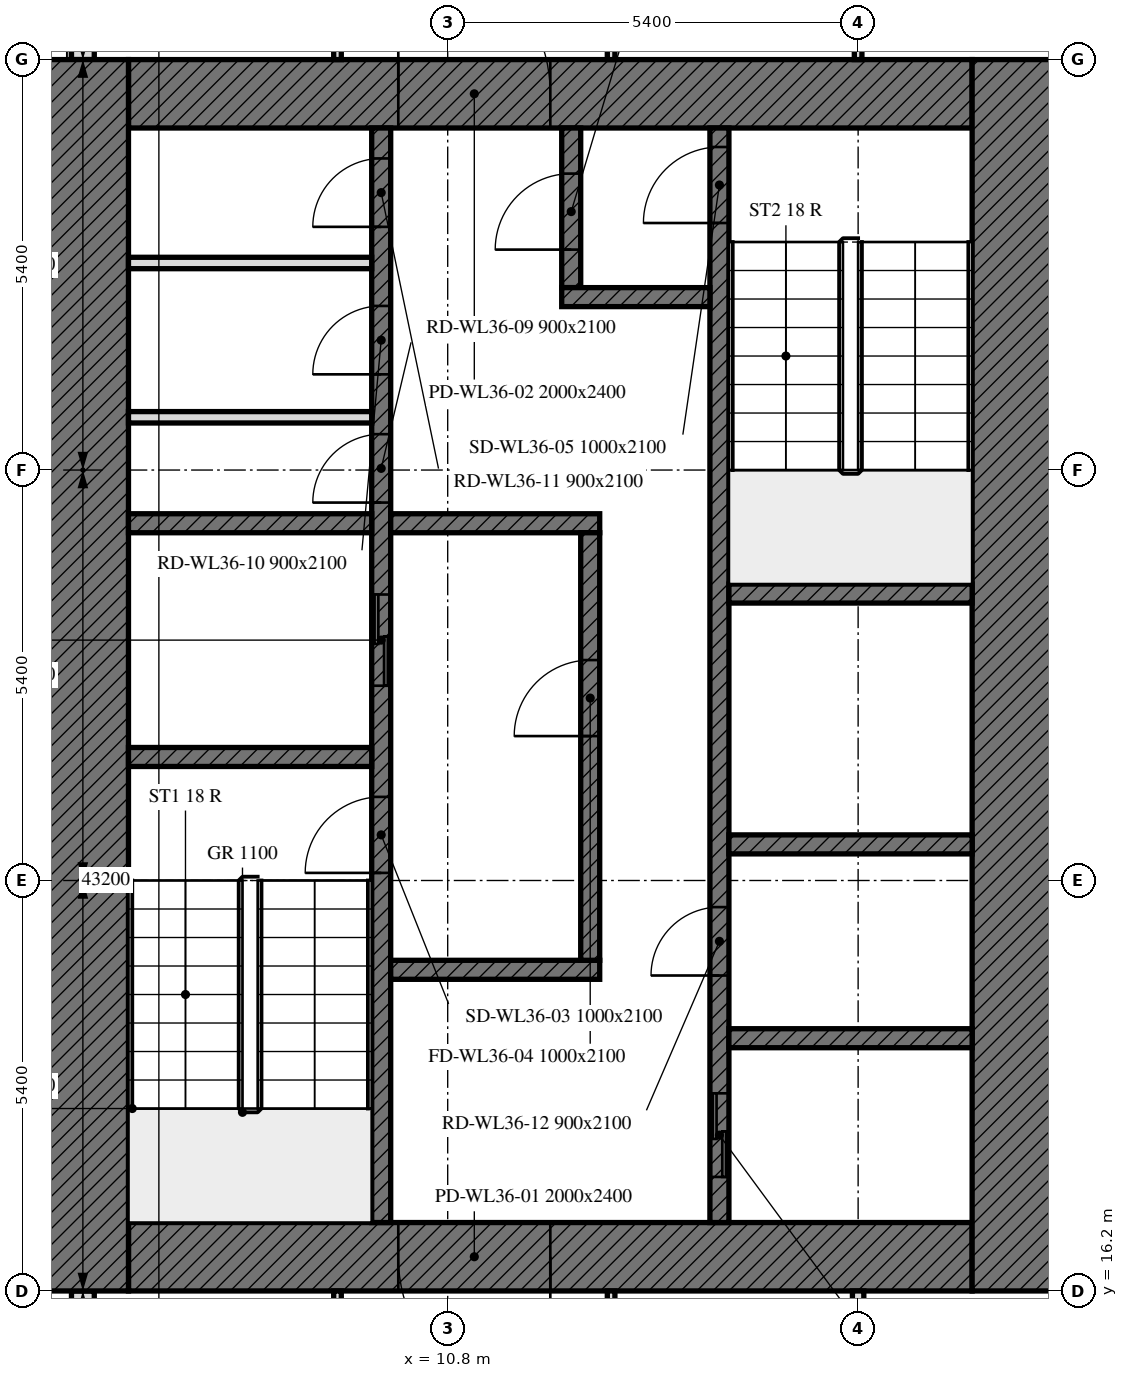
"""IFC4 building model, lengths in metres.
Left out: names, types, materials, properties, quantities, classifications, styles, units other than length and angle.
Written with IfcOpenShell. Run it as: python <this file> out.ifc"""

import sys

from ifc_helpers import new_model, si_unit, direction, frame, frame_2d, origin, place, context, subcontext, project, spatial, rectangle, extrude, element, fill, save


model = new_model("IFC4")
c1 = context("Model", 3, precision=1e-05, world=origin(), true_north=direction((0.0, 1.0)))
c2 = subcontext(c1, "Body", "Model", "MODEL_VIEW")
j1 = project(units=[si_unit("LENGTHUNIT", "METRE"), si_unit("PLANEANGLEUNIT", "RADIAN")], contexts=[c1])
p1 = place(None, origin())
s1 = spatial("IfcSite", under=j1, at=p1, CompositionType="ELEMENT")
p2 = place(p1, origin())
s2 = spatial("IfcBuilding", under=s1, at=p2, CompositionType="ELEMENT")
p3 = place(p2, frame((0.0, 0.0, 156.1)))
s3 = spatial("IfcBuildingStorey", under=s2, at=p3, CompositionType="ELEMENT", Elevation=156.1)
p4 = place(p3, frame((6.0, 37.614, 0.0), z_axis=(0.0, 0.0, 1.0), x_axis=(0.0, -1.0, 0.0)))
e1 = element("IfcWall", 1, at=p4, inside=s3, PredefinedType="SOLIDWALL", context=c2, shape_type="SweptSolid", body=[
    extrude(rectangle(XDim=5.214, YDim=0.3, at=frame_2d((2.607, 0.0))), origin(), (0.0, 0.0, 1.0), 3.0),
])
p5 = place(p4, frame((1.164, 0.0, 0.9)))
e2 = element("IfcOpeningElement", 2, at=p5, cuts=e1, PredefinedType="OPENING", context=c2, shape_type="SweptSolid", body=[
    extrude(rectangle(XDim=1.1, YDim=1.7, at=frame_2d((0.55, 0.85))), frame((0.0, 0.16, 0.0), z_axis=(0.0, -1.0, 0.0), x_axis=(1.0, 0.0, 0.0)), (0.0, 0.0, 1.0), 0.32),
])
p6 = place(p4, frame((2.764, 0.0, 0.9)))
e3 = element("IfcOpeningElement", 3, at=p6, cuts=e1, PredefinedType="OPENING", context=c2, shape_type="SweptSolid", body=[
    extrude(rectangle(XDim=1.1, YDim=1.7, at=frame_2d((0.55, 0.85))), frame((0.0, 0.16, 0.0), z_axis=(0.0, -1.0, 0.0), x_axis=(1.0, 0.0, 0.0)), (0.0, 0.0, 1.0), 0.32),
])
p7 = place(p3, frame((6.0, 16.2, 0.0), z_axis=(0.0, 0.0, 1.0), x_axis=(0.0, -1.0, 0.0)))
e4 = element("IfcWall", 4, at=p7, inside=s3, PredefinedType="SOLIDWALL", context=c2, shape_type="SweptSolid", body=[
    extrude(rectangle(XDim=10.614, YDim=0.3, at=frame_2d((5.307, 0.0))), origin(), (0.0, 0.0, 1.0), 3.0),
])
p8 = place(p7, frame((1.35, 0.0, 0.9)))
e5 = element("IfcOpeningElement", 5, at=p8, cuts=e4, PredefinedType="OPENING", context=c2, shape_type="SweptSolid", body=[
    extrude(rectangle(XDim=1.1, YDim=1.7, at=frame_2d((0.55, 0.85))), frame((0.0, 0.16, 0.0), z_axis=(0.0, -1.0, 0.0), x_axis=(1.0, 0.0, 0.0)), (0.0, 0.0, 1.0), 0.32),
])
p9 = place(p7, frame((2.95, 0.0, 0.9)))
e6 = element("IfcOpeningElement", 6, at=p9, cuts=e4, PredefinedType="OPENING", context=c2, shape_type="SweptSolid", body=[
    extrude(rectangle(XDim=1.1, YDim=1.7, at=frame_2d((0.55, 0.85))), frame((0.0, 0.16, 0.0), z_axis=(0.0, -1.0, 0.0), x_axis=(1.0, 0.0, 0.0)), (0.0, 0.0, 1.0), 0.32),
])
p10 = place(p7, frame((7.375, 0.0, 0.9)))
e7 = element("IfcOpeningElement", 7, at=p10, cuts=e4, PredefinedType="OPENING", context=c2, shape_type="SweptSolid", body=[
    extrude(rectangle(XDim=0.65, YDim=1.7, at=frame_2d((0.325, 0.85))), frame((0.0, 0.16, 0.0), z_axis=(0.0, -1.0, 0.0), x_axis=(1.0, 0.0, 0.0)), (0.0, 0.0, 1.0), 0.32),
])
p11 = place(p7, frame((8.175, 0.0, 0.9)))
e8 = element("IfcOpeningElement", 8, at=p11, cuts=e4, PredefinedType="OPENING", context=c2, shape_type="SweptSolid", body=[
    extrude(rectangle(XDim=0.65, YDim=1.7, at=frame_2d((0.325, 0.85))), frame((0.0, 0.16, 0.0), z_axis=(0.0, -1.0, 0.0), x_axis=(1.0, 0.0, 0.0)), (0.0, 0.0, 1.0), 0.32),
])
p12 = place(p3, frame((17.7, 16.65, 0.0), z_axis=(0.0, 0.0, 1.0), x_axis=(-1.0, 0.0, 0.0)))
e9 = element("IfcWall", 9, at=p12, inside=s3, PredefinedType="SOLIDWALL", context=c2, shape_type="SweptSolid", body=[
    extrude(rectangle(XDim=11.1, YDim=0.9, at=frame_2d((5.55, 0.0))), origin(), (0.0, 0.0, 1.0), 3.0),
])
p13 = place(p12, frame((5.55, 0.0, 0.0)))
e10 = element("IfcOpeningElement", 10, at=p13, cuts=e9, PredefinedType="OPENING", context=c2, shape_type="SweptSolid", body=[
    extrude(rectangle(XDim=2.0, YDim=2.4, at=frame_2d((1.0, 1.2))), frame((0.0, 0.45, 0.0), z_axis=(0.0, -1.0, 0.0), x_axis=(1.0, 0.0, 0.0)), (0.0, 0.0, 1.0), 0.9),
])
p14 = place(p3, frame((6.6, 31.95, 0.0), z_axis=(0.0, 0.0, 1.0), x_axis=(1.0, 0.0, 0.0)))
e11 = element("IfcWall", 11, at=p14, inside=s3, PredefinedType="SOLIDWALL", context=c2, shape_type="SweptSolid", body=[
    extrude(rectangle(XDim=11.1, YDim=0.9, at=frame_2d((5.55, 0.0))), origin(), (0.0, 0.0, 1.0), 3.0),
])
p15 = place(p14, frame((3.55, 0.0, 0.0)))
e12 = element("IfcOpeningElement", 12, at=p15, cuts=e11, PredefinedType="OPENING", context=c2, shape_type="SweptSolid", body=[
    extrude(rectangle(XDim=2.0, YDim=2.4, at=frame_2d((1.0, 1.2))), frame((0.0, 0.45, 0.0), z_axis=(0.0, -1.0, 0.0), x_axis=(1.0, 0.0, 0.0)), (0.0, 0.0, 1.0), 0.9),
])
for number, where, z_axis, x_axis in (
    (13, (6.0, 16.2, 0.0), (0.0, 0.0, 1.0), (0.0, 1.0, 0.0)),
    (14, (18.3, 32.4, 0.0), (0.0, 0.0, 1.0), (0.0, -1.0, 0.0)),
):
    element("IfcWall", number, at=place(p3, frame(where, z_axis=z_axis, x_axis=x_axis)), inside=s3, PredefinedType="SOLIDWALL", context=c2, shape_type="SweptSolid", body=[
        extrude(rectangle(XDim=16.2, YDim=1.2, at=frame_2d((8.1, 0.0))), origin(), (0.0, 0.0, 1.0), 3.0),
    ])
p16 = place(p3, frame((9.925, 17.1, 0.0), z_axis=(0.0, 0.0, 1.0), x_axis=(0.0, 1.0, 0.0)))
e15 = element("IfcWall", 15, at=p16, inside=s3, PredefinedType="SOLIDWALL", context=c2, shape_type="SweptSolid", body=[
    extrude(rectangle(XDim=14.4, YDim=0.25, at=frame_2d((7.2, 0.0))), origin(), (0.0, 0.0, 1.0), 3.0),
])
p17 = place(p16, frame((4.6, 0.0, 0.0)))
e16 = element("IfcOpeningElement", 16, at=p17, cuts=e15, PredefinedType="OPENING", context=c2, shape_type="SweptSolid", body=[
    extrude(rectangle(XDim=1.0, YDim=2.1, at=frame_2d((0.5, 1.05))), frame((0.0, 0.125, 0.0), z_axis=(0.0, -1.0, 0.0), x_axis=(1.0, 0.0, 0.0)), (0.0, 0.0, 1.0), 0.25),
])
p18 = place(p16, frame((7.062, 0.0, 0.0)))
e17 = element("IfcOpeningElement", 17, at=p18, cuts=e15, PredefinedType="OPENING", context=c2, shape_type="SweptSolid", body=[
    extrude(rectangle(XDim=1.2, YDim=2.1, at=frame_2d((0.6, 1.05))), frame((0.0, 0.125, 0.0), z_axis=(0.0, -1.0, 0.0), x_axis=(1.0, 0.0, 0.0)), (0.0, 0.0, 1.0), 0.25),
])
p19 = place(p16, frame((9.472, 0.0, 0.0)))
e18 = element("IfcOpeningElement", 18, at=p19, cuts=e15, PredefinedType="OPENING", context=c2, shape_type="SweptSolid", body=[
    extrude(rectangle(XDim=0.9, YDim=2.1, at=frame_2d((0.45, 1.05))), frame((0.0, 0.125, 0.0), z_axis=(0.0, -1.0, 0.0), x_axis=(1.0, 0.0, 0.0)), (0.0, 0.0, 1.0), 0.25),
])
p20 = place(p16, frame((11.159, 0.0, 0.0)))
e19 = element("IfcOpeningElement", 19, at=p20, cuts=e15, PredefinedType="OPENING", context=c2, shape_type="SweptSolid", body=[
    extrude(rectangle(XDim=0.9, YDim=2.1, at=frame_2d((0.45, 1.05))), frame((0.0, 0.125, 0.0), z_axis=(0.0, -1.0, 0.0), x_axis=(1.0, 0.0, 0.0)), (0.0, 0.0, 1.0), 0.25),
])
p21 = place(p16, frame((13.1, 0.0, 0.0)))
e20 = element("IfcOpeningElement", 20, at=p21, cuts=e15, PredefinedType="OPENING", context=c2, shape_type="SweptSolid", body=[
    extrude(rectangle(XDim=0.9, YDim=2.1, at=frame_2d((0.45, 1.05))), frame((0.0, 0.125, 0.0), z_axis=(0.0, -1.0, 0.0), x_axis=(1.0, 0.0, 0.0)), (0.0, 0.0, 1.0), 0.25),
])
p22 = place(p3, frame((14.375, 17.1, 0.0), z_axis=(0.0, 0.0, 1.0), x_axis=(0.0, 1.0, 0.0)))
e21 = element("IfcWall", 21, at=p22, inside=s3, PredefinedType="SOLIDWALL", context=c2, shape_type="SweptSolid", body=[
    extrude(rectangle(XDim=14.4, YDim=0.25, at=frame_2d((7.2, 0.0))), origin(), (0.0, 0.0, 1.0), 3.0),
])
p23 = place(p22, frame((13.15, 0.0, 0.0)))
e22 = element("IfcOpeningElement", 22, at=p23, cuts=e21, PredefinedType="OPENING", context=c2, shape_type="SweptSolid", body=[
    extrude(rectangle(XDim=1.0, YDim=2.1, at=frame_2d((0.5, 1.05))), frame((0.0, 0.125, 0.0), z_axis=(0.0, -1.0, 0.0), x_axis=(1.0, 0.0, 0.0)), (0.0, 0.0, 1.0), 0.25),
])
p24 = place(p22, frame((0.6, 0.0, 0.0)))
e23 = element("IfcOpeningElement", 23, at=p24, cuts=e21, PredefinedType="OPENING", context=c2, shape_type="SweptSolid", body=[
    extrude(rectangle(XDim=1.1, YDim=2.1, at=frame_2d((0.55, 1.05))), frame((0.0, 0.125, 0.0), z_axis=(0.0, -1.0, 0.0), x_axis=(1.0, 0.0, 0.0)), (0.0, 0.0, 1.0), 0.25),
])
p25 = place(p22, frame((3.25, 0.0, 0.0)))
e24 = element("IfcOpeningElement", 24, at=p25, cuts=e21, PredefinedType="OPENING", context=c2, shape_type="SweptSolid", body=[
    extrude(rectangle(XDim=0.9, YDim=2.1, at=frame_2d((0.45, 1.05))), frame((0.0, 0.125, 0.0), z_axis=(0.0, -1.0, 0.0), x_axis=(1.0, 0.0, 0.0)), (0.0, 0.0, 1.0), 0.25),
])
for number, where, z_axis, x_axis in (
    (25, (6.6, 23.225, 0.0), (0.0, 0.0, 1.0), (1.0, 0.0, 0.0)),
    (26, (14.5, 25.375, 0.0), (0.0, 0.0, 1.0), (1.0, 0.0, 0.0)),
    (27, (14.5, 22.075, 0.0), (0.0, 0.0, 1.0), (1.0, 0.0, 0.0)),
    (28, (6.6, 26.3, 0.0), (0.0, 0.0, 1.0), (1.0, 0.0, 0.0)),
):
    element("IfcWall", number, at=place(p3, frame(where, z_axis=z_axis, x_axis=x_axis)), inside=s3, PredefinedType="SOLIDWALL", context=c2, shape_type="SweptSolid", body=[
        extrude(rectangle(XDim=3.2, YDim=0.25, at=frame_2d((1.6, 0.0))), origin(), (0.0, 0.0, 1.0), 3.0),
    ])
for number, where, z_axis, x_axis in (
    (29, (10.05, 26.3, 0.0), (0.0, 0.0, 1.0), (1.0, 0.0, 0.0)),
    (30, (10.05, 20.425, 0.0), (0.0, 0.0, 1.0), (1.0, 0.0, 0.0)),
):
    element("IfcWall", number, at=place(p3, frame(where, z_axis=z_axis, x_axis=x_axis)), inside=s3, PredefinedType="SOLIDWALL", context=c2, shape_type="SweptSolid", body=[
        extrude(rectangle(XDim=2.75, YDim=0.25, at=frame_2d((1.375, 0.0))), origin(), (0.0, 0.0, 1.0), 3.0),
    ])
p26 = place(p3, frame((12.425, 29.4, 0.0), z_axis=(0.0, 0.0, 1.0), x_axis=(0.0, 1.0, 0.0)))
e31 = element("IfcWall", 31, at=p26, inside=s3, PredefinedType="SOLIDWALL", context=c2, shape_type="SweptSolid", body=[
    extrude(rectangle(XDim=2.1, YDim=0.25, at=frame_2d((1.05, 0.0))), origin(), (0.0, 0.0, 1.0), 3.0),
])
p27 = place(p26, frame((0.5, 0.0, 0.0)))
e32 = element("IfcOpeningElement", 32, at=p27, cuts=e31, PredefinedType="OPENING", context=c2, shape_type="SweptSolid", body=[
    extrude(rectangle(XDim=1.0, YDim=2.1, at=frame_2d((0.5, 1.05))), frame((0.0, 0.125, 0.0), z_axis=(0.0, -1.0, 0.0), x_axis=(1.0, 0.0, 0.0)), (0.0, 0.0, 1.0), 0.25),
])
p28 = place(p3, frame((12.3, 29.275, 0.0), z_axis=(0.0, 0.0, 1.0), x_axis=(1.0, 0.0, 0.0)))
e33 = element("IfcWall", 33, at=p28, inside=s3, PredefinedType="SOLIDWALL", context=c2, shape_type="SweptSolid", body=[
    extrude(rectangle(XDim=1.95, YDim=0.25, at=frame_2d((0.975, 0.0))), origin(), (0.0, 0.0, 1.0), 3.0),
])
p29 = place(p3, frame((12.675, 20.55, 0.0), z_axis=(0.0, 0.0, 1.0), x_axis=(0.0, 1.0, 0.0)))
e34 = element("IfcWall", 34, at=p29, inside=s3, PredefinedType="SOLIDWALL", context=c2, shape_type="SweptSolid", body=[
    extrude(rectangle(XDim=5.625, YDim=0.25, at=frame_2d((2.812, 0.0))), origin(), (0.0, 0.0, 1.0), 3.0),
])
p30 = place(p29, frame((2.95, 0.0, 0.0)))
e35 = element("IfcOpeningElement", 35, at=p30, cuts=e34, PredefinedType="OPENING", context=c2, shape_type="SweptSolid", body=[
    extrude(rectangle(XDim=1.0, YDim=2.1, at=frame_2d((0.5, 1.05))), frame((0.0, 0.125, 0.0), z_axis=(0.0, -1.0, 0.0), x_axis=(1.0, 0.0, 0.0)), (0.0, 0.0, 1.0), 0.25),
])
p31 = place(p3, frame((14.5, 19.525, 0.0), z_axis=(0.0, 0.0, 1.0), x_axis=(1.0, 0.0, 0.0)))
e36 = element("IfcWall", 36, at=p31, inside=s3, PredefinedType="SOLIDWALL", context=c2, shape_type="SweptSolid", body=[
    extrude(rectangle(XDim=3.2, YDim=0.25, at=frame_2d((1.6, 0.0))), origin(), (0.0, 0.0, 1.0), 3.0),
])
for number, where, z_axis, x_axis in (
    (37, (6.6, 27.694, 0.0), (0.0, 0.0, 1.0), (1.0, 0.0, 0.0)),
    (38, (6.6, 29.724, 0.0), (0.0, 0.0, 1.0), (1.0, 0.0, 0.0)),
):
    element("IfcWall", number, at=place(p3, frame(where, z_axis=z_axis, x_axis=x_axis)), inside=s3, PredefinedType="PARTITIONING", context=c2, shape_type="SweptSolid", body=[
        extrude(rectangle(XDim=3.2, YDim=0.15, at=frame_2d((1.6, 0.0))), origin(), (0.0, 0.0, 1.0), 3.0),
    ])
for number, where, z_axis, x_axis in (
    (39, (16.2, 35.025, 0.0), (0.0, 0.0, 1.0), (0.0, -1.0, 0.0)),
    (40, (9.35, 35.025, 0.0), (0.0, 0.0, 1.0), (0.0, -1.0, 0.0)),
    (41, (12.95, 32.4, 0.0), (0.0, 0.0, 1.0), (0.0, 1.0, 0.0)),
):
    element("IfcWall", number, at=place(p3, frame(where, z_axis=z_axis, x_axis=x_axis)), inside=s3, PredefinedType="PARTITIONING", context=c2, shape_type="SweptSolid", body=[
        extrude(rectangle(XDim=2.625, YDim=0.1, at=frame_2d((1.312, 0.0))), origin(), (0.0, 0.0, 1.0), 3.0),
    ])
p32 = place(p3, frame((16.2, 16.2, 0.0), z_axis=(0.0, 0.0, 1.0), x_axis=(0.0, -1.0, 0.0)))
e42 = element("IfcWall", 42, at=p32, inside=s3, PredefinedType="PARTITIONING", context=c2, shape_type="SweptSolid", body=[
    extrude(rectangle(XDim=4.955, YDim=0.15, at=frame_2d((2.478, 0.0))), origin(), (0.0, 0.0, 1.0), 2.4),
])
for number, where, z_axis, x_axis in (
    (43, (9.35, 16.2, 0.0), (0.0, 0.0, 1.0), (0.0, -1.0, 0.0)),
    (44, (12.95, 9.075, 0.0), (0.0, 0.0, 1.0), (0.0, 1.0, 0.0)),
):
    element("IfcWall", number, at=place(p3, frame(where, z_axis=z_axis, x_axis=x_axis)), inside=s3, PredefinedType="PARTITIONING", context=c2, shape_type="SweptSolid", body=[
        extrude(rectangle(XDim=7.125, YDim=0.1, at=frame_2d((3.562, 0.0))), origin(), (0.0, 0.0, 1.0), 3.0),
    ])
p33 = place(p13, origin())
e45 = element("IfcDoor", 45, at=p33, inside=s3, OperationType="DOUBLE_DOOR_SINGLE_SWING", PredefinedType="DOOR", context=c2, shape_type="SweptSolid", body=[
    extrude(rectangle(XDim=2.0, YDim=2.4, at=frame_2d((1.0, 1.2))), frame((0.0, 0.025, 0.0), z_axis=(0.0, -1.0, 0.0), x_axis=(1.0, 0.0, 0.0)), (0.0, 0.0, 1.0), 0.05),
])
fill(e10, e45)
p34 = place(p15, origin())
e46 = element("IfcDoor", 46, at=p34, inside=s3, OperationType="DOUBLE_DOOR_SINGLE_SWING", PredefinedType="DOOR", context=c2, shape_type="SweptSolid", body=[
    extrude(rectangle(XDim=2.0, YDim=2.4, at=frame_2d((1.0, 1.2))), frame((0.0, 0.025, 0.0), z_axis=(0.0, -1.0, 0.0), x_axis=(1.0, 0.0, 0.0)), (0.0, 0.0, 1.0), 0.05),
])
fill(e12, e46)
p35 = place(p17, origin())
e47 = element("IfcDoor", 47, at=p35, inside=s3, OperationType="SINGLE_SWING_LEFT", PredefinedType="DOOR", context=c2, shape_type="SweptSolid", body=[
    extrude(rectangle(XDim=1.0, YDim=2.1, at=frame_2d((0.5, 1.05))), frame((0.0, 0.025, 0.0), z_axis=(0.0, -1.0, 0.0), x_axis=(1.0, 0.0, 0.0)), (0.0, 0.0, 1.0), 0.05),
])
fill(e16, e47)
p36 = place(p30, origin())
e48 = element("IfcDoor", 48, at=p36, inside=s3, OperationType="SINGLE_SWING_LEFT", PredefinedType="DOOR", context=c2, shape_type="SweptSolid", body=[
    extrude(rectangle(XDim=1.0, YDim=2.1, at=frame_2d((0.5, 1.05))), frame((0.0, 0.025, 0.0), z_axis=(0.0, -1.0, 0.0), x_axis=(1.0, 0.0, 0.0)), (0.0, 0.0, 1.0), 0.05),
])
fill(e35, e48)
p37 = place(p23, origin())
e49 = element("IfcDoor", 49, at=p37, inside=s3, OperationType="SINGLE_SWING_LEFT", PredefinedType="DOOR", context=c2, shape_type="SweptSolid", body=[
    extrude(rectangle(XDim=1.0, YDim=2.1, at=frame_2d((0.5, 1.05))), frame((0.0, 0.025, 0.0), z_axis=(0.0, -1.0, 0.0), x_axis=(1.0, 0.0, 0.0)), (0.0, 0.0, 1.0), 0.05),
])
fill(e22, e49)
p38 = place(p27, origin())
e50 = element("IfcDoor", 50, at=p38, inside=s3, OperationType="SINGLE_SWING_LEFT", PredefinedType="DOOR", context=c2, shape_type="SweptSolid", body=[
    extrude(rectangle(XDim=1.0, YDim=2.1, at=frame_2d((0.5, 1.05))), frame((0.0, 0.025, 0.0), z_axis=(0.0, -1.0, 0.0), x_axis=(1.0, 0.0, 0.0)), (0.0, 0.0, 1.0), 0.05),
])
fill(e32, e50)
p39 = place(p18, origin())
e51 = element("IfcDoor", 51, at=p39, inside=s3, OperationType="DOUBLE_DOOR_SLIDING", PredefinedType="DOOR", context=c2, shape_type="SweptSolid", body=[
    extrude(rectangle(XDim=1.2, YDim=2.1, at=frame_2d((0.6, 1.05))), frame((0.0, 0.025, 0.0), z_axis=(0.0, -1.0, 0.0), x_axis=(1.0, 0.0, 0.0)), (0.0, 0.0, 1.0), 0.05),
])
fill(e17, e51)
p40 = place(p24, origin())
e52 = element("IfcDoor", 52, at=p40, inside=s3, OperationType="DOUBLE_DOOR_SLIDING", PredefinedType="DOOR", context=c2, shape_type="SweptSolid", body=[
    extrude(rectangle(XDim=1.1, YDim=2.1, at=frame_2d((0.55, 1.05))), frame((0.0, 0.025, 0.0), z_axis=(0.0, -1.0, 0.0), x_axis=(1.0, 0.0, 0.0)), (0.0, 0.0, 1.0), 0.05),
])
fill(e23, e52)
p41 = place(p19, origin())
e53 = element("IfcDoor", 53, at=p41, inside=s3, OperationType="SINGLE_SWING_LEFT", PredefinedType="DOOR", context=c2, shape_type="SweptSolid", body=[
    extrude(rectangle(XDim=0.9, YDim=2.1, at=frame_2d((0.45, 1.05))), frame((0.0, 0.025, 0.0), z_axis=(0.0, -1.0, 0.0), x_axis=(1.0, 0.0, 0.0)), (0.0, 0.0, 1.0), 0.05),
])
fill(e18, e53)
p42 = place(p20, origin())
e54 = element("IfcDoor", 54, at=p42, inside=s3, OperationType="SINGLE_SWING_LEFT", PredefinedType="DOOR", context=c2, shape_type="SweptSolid", body=[
    extrude(rectangle(XDim=0.9, YDim=2.1, at=frame_2d((0.45, 1.05))), frame((0.0, 0.025, 0.0), z_axis=(0.0, -1.0, 0.0), x_axis=(1.0, 0.0, 0.0)), (0.0, 0.0, 1.0), 0.05),
])
fill(e19, e54)
p43 = place(p21, origin())
e55 = element("IfcDoor", 55, at=p43, inside=s3, OperationType="SINGLE_SWING_LEFT", PredefinedType="DOOR", context=c2, shape_type="SweptSolid", body=[
    extrude(rectangle(XDim=0.9, YDim=2.1, at=frame_2d((0.45, 1.05))), frame((0.0, 0.025, 0.0), z_axis=(0.0, -1.0, 0.0), x_axis=(1.0, 0.0, 0.0)), (0.0, 0.0, 1.0), 0.05),
])
fill(e20, e55)
p44 = place(p25, origin())
e56 = element("IfcDoor", 56, at=p44, inside=s3, OperationType="SINGLE_SWING_LEFT", PredefinedType="DOOR", context=c2, shape_type="SweptSolid", body=[
    extrude(rectangle(XDim=0.9, YDim=2.1, at=frame_2d((0.45, 1.05))), frame((0.0, 0.025, 0.0), z_axis=(0.0, -1.0, 0.0), x_axis=(1.0, 0.0, 0.0)), (0.0, 0.0, 1.0), 0.05),
])
fill(e24, e56)
save(model, sys.argv[1])
